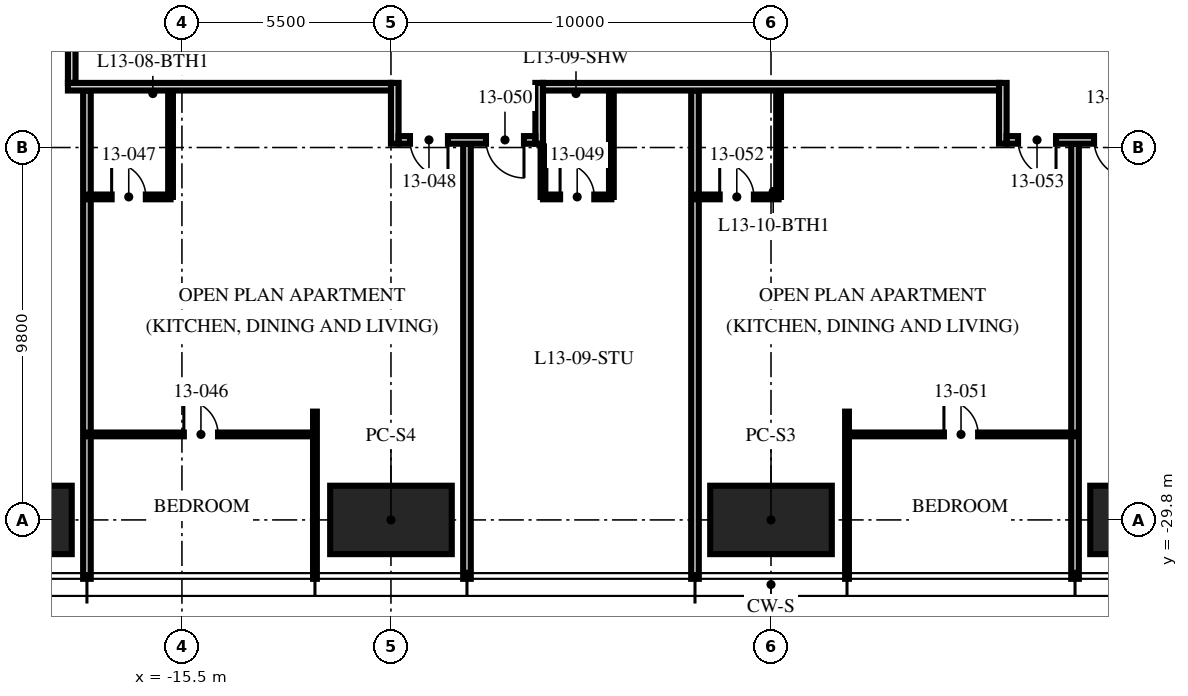
"""IFC4 building model, lengths in metres.
Left out: names, types, materials, properties, quantities, classifications, styles, units other than length and angle.
Written with IfcOpenShell. Run it as: python <this file> out.ifc"""

import sys

from ifc_helpers import new_model, si_unit, direction, frame, frame_2d, origin, origin_2d, place, context, subcontext, project, spatial, rectangle, hollow_rectangle, extrude, element, fill, save


model = new_model("IFC4")
c1 = context("Model", 3, precision=1e-05, world=origin(), true_north=direction((0.0, 1.0)))
c2 = subcontext(c1, "Body", "Model", "MODEL_VIEW")
j1 = project(units=[si_unit("LENGTHUNIT", "METRE"), si_unit("PLANEANGLEUNIT", "RADIAN")], contexts=[c1])
p1 = place(None, origin())
s1 = spatial("IfcSite", under=j1, at=p1, CompositionType="ELEMENT")
p2 = place(p1, origin())
s2 = spatial("IfcBuilding", under=s1, at=p2, CompositionType="ELEMENT")
p3 = place(p2, frame((0.0, 0.0, 54.75)))
s3 = spatial("IfcBuildingStorey", under=s2, at=p3, CompositionType="ELEMENT", Elevation=54.75)
for number, where, z_axis, x_axis in (
    (1, (10.0, -29.8, 0.0), (0.0, 0.0, 1.0), (1.0, 0.0, 0.0)),
    (2, (0.0, -29.8, 0.0), (0.0, 0.0, 1.0), (1.0, 0.0, 0.0)),
    (3, (-10.0, -29.8, 0.0), (0.0, 0.0, 1.0), (1.0, 0.0, 0.0)),
    (4, (-20.0, -29.8, 0.0), (0.0, 0.0, 1.0), (1.0, 0.0, 0.0)),
):
    element("IfcColumn", number, at=place(p3, frame(where, z_axis=z_axis, x_axis=x_axis)), inside=s3, PredefinedType="COLUMN", context=c2, shape_type="SweptSolid", body=[
        extrude(hollow_rectangle(XDim=3.2, YDim=1.8, WallThickness=0.2, at=origin_2d()), origin(), (0.0, 0.0, 1.0), 3.75),
    ])
p4 = place(p3, frame((-18.0, -18.5, 0.0), z_axis=(0.0, 0.0, 1.0), x_axis=(0.0, -1.0, 0.0)))
e5 = element("IfcWall", 5, at=p4, inside=s3, PredefinedType="PARTITIONING", context=c2, shape_type="SweptSolid", body=[
    extrude(rectangle(XDim=12.85, YDim=0.2, at=frame_2d((6.425, 0.0))), origin(), (0.0, 0.0, 1.0), 2.3),
])
p5 = place(p3, frame((-12.0, -26.95, 0.0), z_axis=(0.0, 0.0, 1.0), x_axis=(0.0, -1.0, 0.0)))
e6 = element("IfcWall", 6, at=p5, inside=s3, PredefinedType="PARTITIONING", context=c2, shape_type="SweptSolid", body=[
    extrude(rectangle(XDim=4.4, YDim=0.1, at=frame_2d((2.2, 0.0))), origin(), (0.0, 0.0, 1.0), 2.71),
])
p6 = place(p3, frame((-8.0, -19.9, 0.0), z_axis=(0.0, 0.0, 1.0), x_axis=(0.0, -1.0, 0.0)))
e7 = element("IfcWall", 7, at=p6, inside=s3, PredefinedType="PARTITIONING", context=c2, shape_type="SweptSolid", body=[
    extrude(rectangle(XDim=11.45, YDim=0.2, at=frame_2d((5.725, 0.0))), origin(), (0.0, 0.0, 1.0), 2.71),
])
p7 = place(p3, frame((-2.0, -18.5, 0.0), z_axis=(0.0, 0.0, 1.0), x_axis=(0.0, -1.0, 0.0)))
e8 = element("IfcWall", 8, at=p7, inside=s3, PredefinedType="PARTITIONING", context=c2, shape_type="SweptSolid", body=[
    extrude(rectangle(XDim=12.85, YDim=0.2, at=frame_2d((6.425, 0.0))), origin(), (0.0, 0.0, 1.0), 2.71),
])
p8 = place(p3, frame((2.0, -26.95, 0.0), z_axis=(0.0, 0.0, 1.0), x_axis=(0.0, -1.0, 0.0)))
e9 = element("IfcWall", 9, at=p8, inside=s3, PredefinedType="PARTITIONING", context=c2, shape_type="SweptSolid", body=[
    extrude(rectangle(XDim=4.4, YDim=0.1, at=frame_2d((2.2, 0.0))), origin(), (0.0, 0.0, 1.0), 2.71),
])
p9 = place(p3, frame((8.0, -19.9, 0.0), z_axis=(0.0, 0.0, 1.0), x_axis=(0.0, -1.0, 0.0)))
e10 = element("IfcWall", 10, at=p9, inside=s3, PredefinedType="PARTITIONING", context=c2, shape_type="SweptSolid", body=[
    extrude(rectangle(XDim=11.45, YDim=0.2, at=frame_2d((5.725, 0.0))), origin(), (0.0, 0.0, 1.0), 2.71),
])
p10 = place(p3, frame((-18.0, -27.55, 0.0), z_axis=(0.0, 0.0, 1.0), x_axis=(1.0, 0.0, 0.0)))
e11 = element("IfcWall", 11, at=p10, inside=s3, PredefinedType="PARTITIONING", context=c2, shape_type="SweptSolid", body=[
    extrude(rectangle(XDim=6.0, YDim=0.1, at=frame_2d((3.0, 0.0))), origin(), (0.0, 0.0, 1.0), 2.61),
])
p11 = place(p10, frame((2.55, 0.0, 0.0)))
e12 = element("IfcOpeningElement", 12, at=p11, cuts=e11, PredefinedType="OPENING", context=c2, shape_type="SweptSolid", body=[
    extrude(rectangle(XDim=0.9, YDim=2.1, at=frame_2d((0.45, 1.05))), frame((0.0, 0.06, 0.0), z_axis=(0.0, -1.0, 0.0), x_axis=(1.0, 0.0, 0.0)), (0.0, 0.0, 1.0), 0.12),
])
p12 = place(p3, frame((-18.0, -21.3, 0.0), z_axis=(0.0, 0.0, 1.0), x_axis=(1.0, 0.0, 0.0)))
e13 = element("IfcWall", 13, at=p12, inside=s3, PredefinedType="PARTITIONING", context=c2, shape_type="SweptSolid", body=[
    extrude(rectangle(XDim=2.2, YDim=0.125, at=frame_2d((1.1, 0.0))), origin(), (0.0, 0.0, 1.0), 3.5),
])
p13 = place(p12, frame((0.65, 0.0, 0.0)))
e14 = element("IfcOpeningElement", 14, at=p13, cuts=e13, PredefinedType="OPENING", context=c2, shape_type="SweptSolid", body=[
    extrude(rectangle(XDim=0.9, YDim=2.1, at=frame_2d((0.45, 1.05))), frame((0.0, 0.073, 0.0), z_axis=(0.0, -1.0, 0.0), x_axis=(1.0, 0.0, 0.0)), (0.0, 0.0, 1.0), 0.145),
])
p14 = place(p3, frame((-15.8, -18.5, 0.0), z_axis=(0.0, 0.0, 1.0), x_axis=(0.0, -1.0, 0.0)))
e15 = element("IfcWall", 15, at=p14, inside=s3, PredefinedType="PARTITIONING", context=c2, shape_type="SweptSolid", body=[
    extrude(rectangle(XDim=2.8, YDim=0.125, at=frame_2d((1.4, 0.0))), origin(), (0.0, 0.0, 1.0), 3.5),
])
p15 = place(p3, frame((-6.0, -21.3, 0.0), z_axis=(0.0, 0.0, 1.0), x_axis=(1.0, 0.0, 0.0)))
e16 = element("IfcWall", 16, at=p15, inside=s3, PredefinedType="PARTITIONING", context=c2, shape_type="SweptSolid", body=[
    extrude(rectangle(XDim=1.8, YDim=0.125, at=frame_2d((0.9, 0.0))), origin(), (0.0, 0.0, 1.0), 2.61),
])
p16 = place(p15, frame((0.45, 0.0, 0.0)))
e17 = element("IfcOpeningElement", 17, at=p16, cuts=e16, PredefinedType="OPENING", context=c2, shape_type="SweptSolid", body=[
    extrude(rectangle(XDim=0.9, YDim=2.1, at=frame_2d((0.45, 1.05))), frame((0.0, 0.073, 0.0), z_axis=(0.0, -1.0, 0.0), x_axis=(1.0, 0.0, 0.0)), (0.0, 0.0, 1.0), 0.145),
])
p17 = place(p3, frame((-6.0, -19.97, 0.0), z_axis=(0.0, 0.0, 1.0), x_axis=(0.0, -1.0, 0.0)))
e18 = element("IfcWall", 18, at=p17, inside=s3, PredefinedType="PARTITIONING", context=c2, shape_type="SweptSolid", body=[
    extrude(rectangle(XDim=1.33, YDim=0.125, at=frame_2d((0.665, 0.0))), origin(), (0.0, 0.0, 1.0), 3.5),
])
p18 = place(p3, frame((-4.2, -18.5, 0.0), z_axis=(0.0, 0.0, 1.0), x_axis=(0.0, -1.0, 0.0)))
e19 = element("IfcWall", 19, at=p18, inside=s3, PredefinedType="PARTITIONING", context=c2, shape_type="SweptSolid", body=[
    extrude(rectangle(XDim=2.8, YDim=0.125, at=frame_2d((1.4, 0.0))), origin(), (0.0, 0.0, 1.0), 3.5),
])
p19 = place(p3, frame((2.0, -27.55, 0.0), z_axis=(0.0, 0.0, 1.0), x_axis=(1.0, 0.0, 0.0)))
e20 = element("IfcWall", 20, at=p19, inside=s3, PredefinedType="PARTITIONING", context=c2, shape_type="SweptSolid", body=[
    extrude(rectangle(XDim=6.0, YDim=0.1, at=frame_2d((3.0, 0.0))), origin(), (0.0, 0.0, 1.0), 2.61),
])
p20 = place(p19, frame((2.55, 0.0, 0.0)))
e21 = element("IfcOpeningElement", 21, at=p20, cuts=e20, PredefinedType="OPENING", context=c2, shape_type="SweptSolid", body=[
    extrude(rectangle(XDim=0.9, YDim=2.1, at=frame_2d((0.45, 1.05))), frame((0.0, 0.06, 0.0), z_axis=(0.0, -1.0, 0.0), x_axis=(1.0, 0.0, 0.0)), (0.0, 0.0, 1.0), 0.12),
])
p21 = place(p3, frame((-2.0, -21.3, 0.0), z_axis=(0.0, 0.0, 1.0), x_axis=(1.0, 0.0, 0.0)))
e22 = element("IfcWall", 22, at=p21, inside=s3, PredefinedType="PARTITIONING", context=c2, shape_type="SweptSolid", body=[
    extrude(rectangle(XDim=2.2, YDim=0.125, at=frame_2d((1.1, 0.0))), origin(), (0.0, 0.0, 1.0), 2.492),
])
p22 = place(p21, frame((0.65, 0.0, 0.0)))
e23 = element("IfcOpeningElement", 23, at=p22, cuts=e22, PredefinedType="OPENING", context=c2, shape_type="SweptSolid", body=[
    extrude(rectangle(XDim=0.9, YDim=2.1, at=frame_2d((0.45, 1.05))), frame((0.0, 0.073, 0.0), z_axis=(0.0, -1.0, 0.0), x_axis=(1.0, 0.0, 0.0)), (0.0, 0.0, 1.0), 0.145),
])
p23 = place(p3, frame((0.2, -18.5, 0.0), z_axis=(0.0, 0.0, 1.0), x_axis=(0.0, -1.0, 0.0)))
e24 = element("IfcWall", 24, at=p23, inside=s3, PredefinedType="PARTITIONING", context=c2, shape_type="SweptSolid", body=[
    extrude(rectangle(XDim=2.8, YDim=0.125, at=frame_2d((1.4, 0.0))), origin(), (0.0, 0.0, 1.0), 2.492),
])
p24 = place(p3, frame((-18.4, 0.0, 0.0), z_axis=(0.0, 0.0, 1.0), x_axis=(0.0, -1.0, 0.0)))
e25 = element("IfcWall", 25, at=p24, inside=s3, PredefinedType="PARTITIONING", context=c2, shape_type="SweptSolid", body=[
    extrude(rectangle(XDim=18.3, YDim=0.2, at=frame_2d((9.15, 0.0))), origin(), (0.0, 0.0, 1.0), 2.3),
])
p25 = place(p3, frame((6.1, -18.3, 0.0), z_axis=(0.0, 0.0, 1.0), x_axis=(0.0, -1.0, 0.0)))
e26 = element("IfcWall", 26, at=p25, inside=s3, PredefinedType="PARTITIONING", context=c2, shape_type="SweptSolid", body=[
    extrude(rectangle(XDim=1.6, YDim=0.2, at=frame_2d((0.8, 0.0))), origin(), (0.0, 0.0, 1.0), 3.5),
])
p26 = place(p3, frame((9.8, -19.8, 0.0), z_axis=(0.0, 0.0, 1.0), x_axis=(-1.0, 0.0, 0.0)))
e27 = element("IfcWall", 27, at=p26, inside=s3, PredefinedType="PARTITIONING", context=c2, shape_type="SweptSolid", body=[
    extrude(rectangle(XDim=3.6, YDim=0.2, at=frame_2d((1.8, 0.0))), origin(), (0.0, 0.0, 1.0), 3.5),
])
p27 = place(p26, frame((2.3, 0.0, 0.0)))
e28 = element("IfcOpeningElement", 28, at=p27, cuts=e27, PredefinedType="OPENING", context=c2, shape_type="SweptSolid", body=[
    extrude(rectangle(XDim=1.0, YDim=2.2, at=frame_2d((0.5, 1.1))), frame((0.0, 0.11, 0.0), z_axis=(0.0, -1.0, 0.0), x_axis=(1.0, 0.0, 0.0)), (0.0, 0.0, 1.0), 0.22),
])
p28 = place(p26, frame((0.3, 0.0, 0.0)))
e29 = element("IfcOpeningElement", 29, at=p28, cuts=e27, PredefinedType="OPENING", context=c2, shape_type="SweptSolid", body=[
    extrude(rectangle(XDim=1.0, YDim=2.2, at=frame_2d((0.5, 1.1))), frame((0.0, 0.11, 0.0), z_axis=(0.0, -1.0, 0.0), x_axis=(1.0, 0.0, 0.0)), (0.0, 0.0, 1.0), 0.22),
])
p29 = place(p3, frame((6.0, -18.4, 0.0), z_axis=(0.0, 0.0, 1.0), x_axis=(-1.0, 0.0, 0.0)))
e30 = element("IfcWall", 30, at=p29, inside=s3, PredefinedType="PARTITIONING", context=c2, shape_type="SweptSolid", body=[
    extrude(rectangle(XDim=12.0, YDim=0.2, at=frame_2d((6.0, 0.0))), origin(), (0.0, 0.0, 1.0), 2.492),
])
p30 = place(p3, frame((-6.1, -18.3, 0.0), z_axis=(0.0, 0.0, 1.0), x_axis=(0.0, -1.0, 0.0)))
e31 = element("IfcWall", 31, at=p30, inside=s3, PredefinedType="PARTITIONING", context=c2, shape_type="SweptSolid", body=[
    extrude(rectangle(XDim=1.6, YDim=0.2, at=frame_2d((0.8, 0.0))), origin(), (0.0, 0.0, 1.0), 3.5),
])
p31 = place(p3, frame((-9.9, -18.3, 0.0), z_axis=(0.0, 0.0, 1.0), x_axis=(0.0, -1.0, 0.0)))
e32 = element("IfcWall", 32, at=p31, inside=s3, PredefinedType="PARTITIONING", context=c2, shape_type="SweptSolid", body=[
    extrude(rectangle(XDim=1.6, YDim=0.2, at=frame_2d((0.8, 0.0))), origin(), (0.0, 0.0, 1.0), 2.492),
])
p32 = place(p3, frame((-6.2, -19.8, 0.0), z_axis=(0.0, 0.0, 1.0), x_axis=(-1.0, 0.0, 0.0)))
e33 = element("IfcWall", 33, at=p32, inside=s3, PredefinedType="PARTITIONING", context=c2, shape_type="SweptSolid", body=[
    extrude(rectangle(XDim=3.6, YDim=0.2, at=frame_2d((1.8, 0.0))), origin(), (0.0, 0.0, 1.0), 3.5),
])
p33 = place(p32, frame((2.3, 0.0, 0.0)))
e34 = element("IfcOpeningElement", 34, at=p33, cuts=e33, PredefinedType="OPENING", context=c2, shape_type="SweptSolid", body=[
    extrude(rectangle(XDim=1.0, YDim=2.2, at=frame_2d((0.5, 1.1))), frame((0.0, 0.11, 0.0), z_axis=(0.0, -1.0, 0.0), x_axis=(1.0, 0.0, 0.0)), (0.0, 0.0, 1.0), 0.22),
])
p34 = place(p32, frame((0.3, 0.0, 0.0)))
e35 = element("IfcOpeningElement", 35, at=p34, cuts=e33, PredefinedType="OPENING", context=c2, shape_type="SweptSolid", body=[
    extrude(rectangle(XDim=1.0, YDim=2.2, at=frame_2d((0.5, 1.1))), frame((0.0, 0.11, 0.0), z_axis=(0.0, -1.0, 0.0), x_axis=(1.0, 0.0, 0.0)), (0.0, 0.0, 1.0), 0.22),
])
p35 = place(p3, frame((-10.0, -18.4, 0.0), z_axis=(0.0, 0.0, 1.0), x_axis=(-1.0, 0.0, 0.0)))
e36 = element("IfcWall", 36, at=p35, inside=s3, PredefinedType="PARTITIONING", context=c2, shape_type="SweptSolid", body=[
    extrude(rectangle(XDim=8.5, YDim=0.2, at=frame_2d((4.25, 0.0))), origin(), (0.0, 0.0, 1.0), 2.3),
])
p36 = place(p11, origin())
e37 = element("IfcDoor", 37, at=p36, inside=s3, OperationType="SINGLE_SWING_LEFT", PredefinedType="DOOR", context=c2, shape_type="SweptSolid", body=[
    extrude(rectangle(XDim=0.9, YDim=2.1, at=frame_2d((0.45, 1.05))), frame((0.0, 0.025, 0.0), z_axis=(0.0, -1.0, 0.0), x_axis=(1.0, 0.0, 0.0)), (0.0, 0.0, 1.0), 0.05),
])
fill(e12, e37)
p37 = place(p13, origin())
e38 = element("IfcDoor", 38, at=p37, inside=s3, OperationType="SINGLE_SWING_LEFT", PredefinedType="DOOR", context=c2, shape_type="SweptSolid", body=[
    extrude(rectangle(XDim=0.9, YDim=2.1, at=frame_2d((0.45, 1.05))), frame((0.0, 0.025, 0.0), z_axis=(0.0, -1.0, 0.0), x_axis=(1.0, 0.0, 0.0)), (0.0, 0.0, 1.0), 0.05),
])
fill(e14, e38)
p38 = place(p33, origin())
e39 = element("IfcDoor", 39, at=p38, inside=s3, OperationType="SINGLE_SWING_LEFT", PredefinedType="DOOR", context=c2, shape_type="SweptSolid", body=[
    extrude(rectangle(XDim=1.0, YDim=2.2, at=frame_2d((0.5, 1.1))), frame((0.0, 0.025, 0.0), z_axis=(0.0, -1.0, 0.0), x_axis=(1.0, 0.0, 0.0)), (0.0, 0.0, 1.0), 0.05),
])
fill(e34, e39)
p39 = place(p16, origin())
e40 = element("IfcDoor", 40, at=p39, inside=s3, OperationType="SINGLE_SWING_LEFT", PredefinedType="DOOR", context=c2, shape_type="SweptSolid", body=[
    extrude(rectangle(XDim=0.9, YDim=2.1, at=frame_2d((0.45, 1.05))), frame((0.0, 0.025, 0.0), z_axis=(0.0, -1.0, 0.0), x_axis=(1.0, 0.0, 0.0)), (0.0, 0.0, 1.0), 0.05),
])
fill(e17, e40)
p40 = place(p34, origin())
e41 = element("IfcDoor", 41, at=p40, inside=s3, OperationType="SINGLE_SWING_LEFT", PredefinedType="DOOR", context=c2, shape_type="SweptSolid", body=[
    extrude(rectangle(XDim=1.0, YDim=2.2, at=frame_2d((0.5, 1.1))), frame((0.0, 0.025, 0.0), z_axis=(0.0, -1.0, 0.0), x_axis=(1.0, 0.0, 0.0)), (0.0, 0.0, 1.0), 0.05),
])
fill(e35, e41)
p41 = place(p20, origin())
e42 = element("IfcDoor", 42, at=p41, inside=s3, OperationType="SINGLE_SWING_LEFT", PredefinedType="DOOR", context=c2, shape_type="SweptSolid", body=[
    extrude(rectangle(XDim=0.9, YDim=2.1, at=frame_2d((0.45, 1.05))), frame((0.0, 0.025, 0.0), z_axis=(0.0, -1.0, 0.0), x_axis=(1.0, 0.0, 0.0)), (0.0, 0.0, 1.0), 0.05),
])
fill(e21, e42)
p42 = place(p22, origin())
e43 = element("IfcDoor", 43, at=p42, inside=s3, OperationType="SINGLE_SWING_LEFT", PredefinedType="DOOR", context=c2, shape_type="SweptSolid", body=[
    extrude(rectangle(XDim=0.9, YDim=2.1, at=frame_2d((0.45, 1.05))), frame((0.0, 0.025, 0.0), z_axis=(0.0, -1.0, 0.0), x_axis=(1.0, 0.0, 0.0)), (0.0, 0.0, 1.0), 0.05),
])
fill(e23, e43)
p43 = place(p27, origin())
e44 = element("IfcDoor", 44, at=p43, inside=s3, OperationType="SINGLE_SWING_LEFT", PredefinedType="DOOR", context=c2, shape_type="SweptSolid", body=[
    extrude(rectangle(XDim=1.0, YDim=2.2, at=frame_2d((0.5, 1.1))), frame((0.0, 0.025, 0.0), z_axis=(0.0, -1.0, 0.0), x_axis=(1.0, 0.0, 0.0)), (0.0, 0.0, 1.0), 0.05),
])
fill(e28, e44)
p44 = place(p28, origin())
e45 = element("IfcDoor", 45, at=p44, inside=s3, OperationType="SINGLE_SWING_LEFT", PredefinedType="DOOR", context=c2, shape_type="SweptSolid", body=[
    extrude(rectangle(XDim=1.0, YDim=2.2, at=frame_2d((0.5, 1.1))), frame((0.0, 0.025, 0.0), z_axis=(0.0, -1.0, 0.0), x_axis=(1.0, 0.0, 0.0)), (0.0, 0.0, 1.0), 0.05),
])
fill(e29, e45)
save(model, sys.argv[1])
